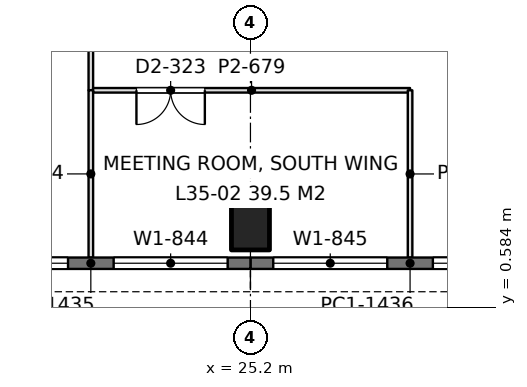
"""IFC4 building model, lengths in metres.
Left out: names, types, materials, properties, quantities, classifications, styles, units other than length and angle.
Written with IfcOpenShell. Run it as: python <this file> out.ifc"""

import sys

from ifc_helpers import new_model, si_unit, direction, frame, frame_2d, origin, origin_2d, place, context, subcontext, project, spatial, rectangle, extrude, element, fill, save


model = new_model("IFC4")
c1 = context("Model", 3, precision=1e-05, world=origin(), true_north=direction((0.0, 1.0)))
c2 = subcontext(c1, "Body", "Model", "MODEL_VIEW")
j1 = project(units=[si_unit("LENGTHUNIT", "METRE"), si_unit("PLANEANGLEUNIT", "RADIAN")], contexts=[c1])
p1 = place(None, origin())
s1 = spatial("IfcSite", under=j1, at=p1, CompositionType="ELEMENT")
p2 = place(p1, origin())
s2 = spatial("IfcBuilding", under=s1, at=p2, CompositionType="ELEMENT")
p3 = place(p2, frame((0.0, 0.0, 155.4)))
s3 = spatial("IfcBuildingStorey", under=s2, at=p3, CompositionType="ELEMENT", Elevation=155.4)
p4 = place(p3, frame((25.2, 2.8, 0.0), z_axis=(0.0, 0.0, 1.0), x_axis=(1.0, 0.0, 0.0)))
e1 = element("IfcColumn", 1, at=p4, inside=s3, PredefinedType="COLUMN", context=c2, shape_type="SweptSolid", body=[
    extrude(rectangle(XDim=1.0, YDim=1.4, at=origin_2d()), origin(), (0.0, 0.0, 1.0), 4.2),
])
p5 = place(p3, frame((33.6, 1.75, 0.0), z_axis=(0.0, 0.0, 1.0), x_axis=(-1.0, 0.0, 0.0)))
e2 = element("IfcWall", 2, at=p5, inside=s3, PredefinedType="SOLIDWALL", context=c2, shape_type="SweptSolid", body=[
    extrude(rectangle(XDim=8.4, YDim=0.3, at=frame_2d((4.2, 0.0))), origin(), (0.0, 0.0, 1.0), 4.05),
])
p6 = place(p5, frame((0.6, 0.0, 0.9)))
e3 = element("IfcOpeningElement", 3, at=p6, cuts=e2, PredefinedType="OPENING", context=c2, shape_type="SweptSolid", body=[
    extrude(rectangle(XDim=3.0, YDim=1.9, at=frame_2d((1.5, 0.95))), frame((0.0, 0.16, 0.0), z_axis=(0.0, -1.0, 0.0), x_axis=(1.0, 0.0, 0.0)), (0.0, 0.0, 1.0), 0.32),
])
p7 = place(p5, frame((4.8, 0.0, 0.9)))
e4 = element("IfcOpeningElement", 4, at=p7, cuts=e2, PredefinedType="OPENING", context=c2, shape_type="SweptSolid", body=[
    extrude(rectangle(XDim=3.0, YDim=1.9, at=frame_2d((1.5, 0.95))), frame((0.0, 0.16, 0.0), z_axis=(0.0, -1.0, 0.0), x_axis=(1.0, 0.0, 0.0)), (0.0, 0.0, 1.0), 0.32),
])
p8 = place(p3, frame((25.2, 1.75, 0.0), z_axis=(0.0, 0.0, 1.0), x_axis=(-1.0, 0.0, 0.0)))
e5 = element("IfcWall", 5, at=p8, inside=s3, PredefinedType="SOLIDWALL", context=c2, shape_type="SweptSolid", body=[
    extrude(rectangle(XDim=8.4, YDim=0.3, at=frame_2d((4.2, 0.0))), origin(), (0.0, 0.0, 1.0), 4.05),
])
p9 = place(p8, frame((0.6, 0.0, 0.9)))
e6 = element("IfcOpeningElement", 6, at=p9, cuts=e5, PredefinedType="OPENING", context=c2, shape_type="SweptSolid", body=[
    extrude(rectangle(XDim=3.0, YDim=1.9, at=frame_2d((1.5, 0.95))), frame((0.0, 0.16, 0.0), z_axis=(0.0, -1.0, 0.0), x_axis=(1.0, 0.0, 0.0)), (0.0, 0.0, 1.0), 0.32),
])
p10 = place(p8, frame((4.8, 0.0, 0.9)))
e7 = element("IfcOpeningElement", 7, at=p10, cuts=e5, PredefinedType="OPENING", context=c2, shape_type="SweptSolid", body=[
    extrude(rectangle(XDim=3.0, YDim=1.9, at=frame_2d((1.5, 0.95))), frame((0.0, 0.16, 0.0), z_axis=(0.0, -1.0, 0.0), x_axis=(1.0, 0.0, 0.0)), (0.0, 0.0, 1.0), 0.32),
])
p11 = place(p3, frame((21.058, 6.3, 0.0), z_axis=(0.0, 0.0, 1.0), x_axis=(1.0, 0.0, 0.0)))
e8 = element("IfcWall", 8, at=p11, inside=s3, PredefinedType="PARTITIONING", context=c2, shape_type="SweptSolid", body=[
    extrude(rectangle(XDim=8.342, YDim=0.12, at=frame_2d((4.171, 0.0))), origin(), (0.0, 0.0, 1.0), 3.55),
])
p12 = place(p11, frame((1.142, 0.0, 0.0)))
e9 = element("IfcOpeningElement", 9, at=p12, cuts=e8, PredefinedType="OPENING", context=c2, shape_type="SweptSolid", body=[
    extrude(rectangle(XDim=1.8, YDim=2.2, at=frame_2d((0.9, 1.1))), frame((0.0, 0.07, 0.0), z_axis=(0.0, -1.0, 0.0), x_axis=(1.0, 0.0, 0.0)), (0.0, 0.0, 1.0), 0.14),
])
p13 = place(p3, frame((21.0, 1.898, 0.0), z_axis=(0.0, 0.0, 1.0), x_axis=(0.0, 1.0, 0.0)))
e10 = element("IfcWall", 10, at=p13, inside=s3, PredefinedType="PARTITIONING", context=c2, shape_type="SweptSolid", body=[
    extrude(rectangle(XDim=4.404, YDim=0.12, at=frame_2d((2.202, 0.0))), origin(), (0.0, 0.0, 1.0), 3.56),
])
p14 = place(p3, frame((29.4, 1.898, 0.0), z_axis=(0.0, 0.0, 1.0), x_axis=(0.0, 1.0, 0.0)))
e11 = element("IfcWall", 11, at=p14, inside=s3, PredefinedType="PARTITIONING", context=c2, shape_type="SweptSolid", body=[
    extrude(rectangle(XDim=4.402, YDim=0.12, at=frame_2d((2.201, 0.0))), origin(), (0.0, 0.0, 1.0), 3.56),
])
p15 = place(p3, frame((21.0, 6.298, 0.0), z_axis=(0.0, 0.0, 1.0), x_axis=(0.0, 1.0, 0.0)))
e12 = element("IfcWall", 12, at=p15, inside=s3, PredefinedType="PARTITIONING", context=c2, shape_type="SweptSolid", body=[
    extrude(rectangle(XDim=6.244, YDim=0.12, at=frame_2d((3.122, 0.0))), origin(), (0.0, 0.0, 1.0), 3.55),
])
p16 = place(p6, origin())
e13 = element("IfcWindow", 13, at=p16, inside=s3, PartitioningType="SINGLE_PANEL", PredefinedType="WINDOW", context=c2, shape_type="SweptSolid", body=[
    extrude(rectangle(XDim=3.0, YDim=1.9, at=frame_2d((1.5, 0.95))), frame((0.0, 0.03, 0.0), z_axis=(0.0, -1.0, 0.0), x_axis=(1.0, 0.0, 0.0)), (0.0, 0.0, 1.0), 0.06),
])
fill(e3, e13)
p17 = place(p7, origin())
e14 = element("IfcWindow", 14, at=p17, inside=s3, PartitioningType="SINGLE_PANEL", PredefinedType="WINDOW", context=c2, shape_type="SweptSolid", body=[
    extrude(rectangle(XDim=3.0, YDim=1.9, at=frame_2d((1.5, 0.95))), frame((0.0, 0.03, 0.0), z_axis=(0.0, -1.0, 0.0), x_axis=(1.0, 0.0, 0.0)), (0.0, 0.0, 1.0), 0.06),
])
fill(e4, e14)
p18 = place(p9, origin())
e15 = element("IfcWindow", 15, at=p18, inside=s3, PartitioningType="SINGLE_PANEL", PredefinedType="WINDOW", context=c2, shape_type="SweptSolid", body=[
    extrude(rectangle(XDim=3.0, YDim=1.9, at=frame_2d((1.5, 0.95))), frame((0.0, 0.03, 0.0), z_axis=(0.0, -1.0, 0.0), x_axis=(1.0, 0.0, 0.0)), (0.0, 0.0, 1.0), 0.06),
])
fill(e6, e15)
p19 = place(p10, origin())
e16 = element("IfcWindow", 16, at=p19, inside=s3, PartitioningType="SINGLE_PANEL", PredefinedType="WINDOW", context=c2, shape_type="SweptSolid", body=[
    extrude(rectangle(XDim=3.0, YDim=1.9, at=frame_2d((1.5, 0.95))), frame((0.0, 0.03, 0.0), z_axis=(0.0, -1.0, 0.0), x_axis=(1.0, 0.0, 0.0)), (0.0, 0.0, 1.0), 0.06),
])
fill(e7, e16)
p20 = place(p12, frame((1.8, 0.0, 0.0), z_axis=(0.0, 0.0, 1.0), x_axis=(-1.0, 0.0, 0.0)))
e17 = element("IfcDoor", 17, at=p20, inside=s3, OperationType="DOUBLE_DOOR_SINGLE_SWING", PredefinedType="DOOR", context=c2, shape_type="SweptSolid", body=[
    extrude(rectangle(XDim=1.8, YDim=2.2, at=frame_2d((0.9, 1.1))), frame((0.0, 0.025, 0.0), z_axis=(0.0, -1.0, 0.0), x_axis=(1.0, 0.0, 0.0)), (0.0, 0.0, 1.0), 0.05),
])
fill(e9, e17)
save(model, sys.argv[1])
